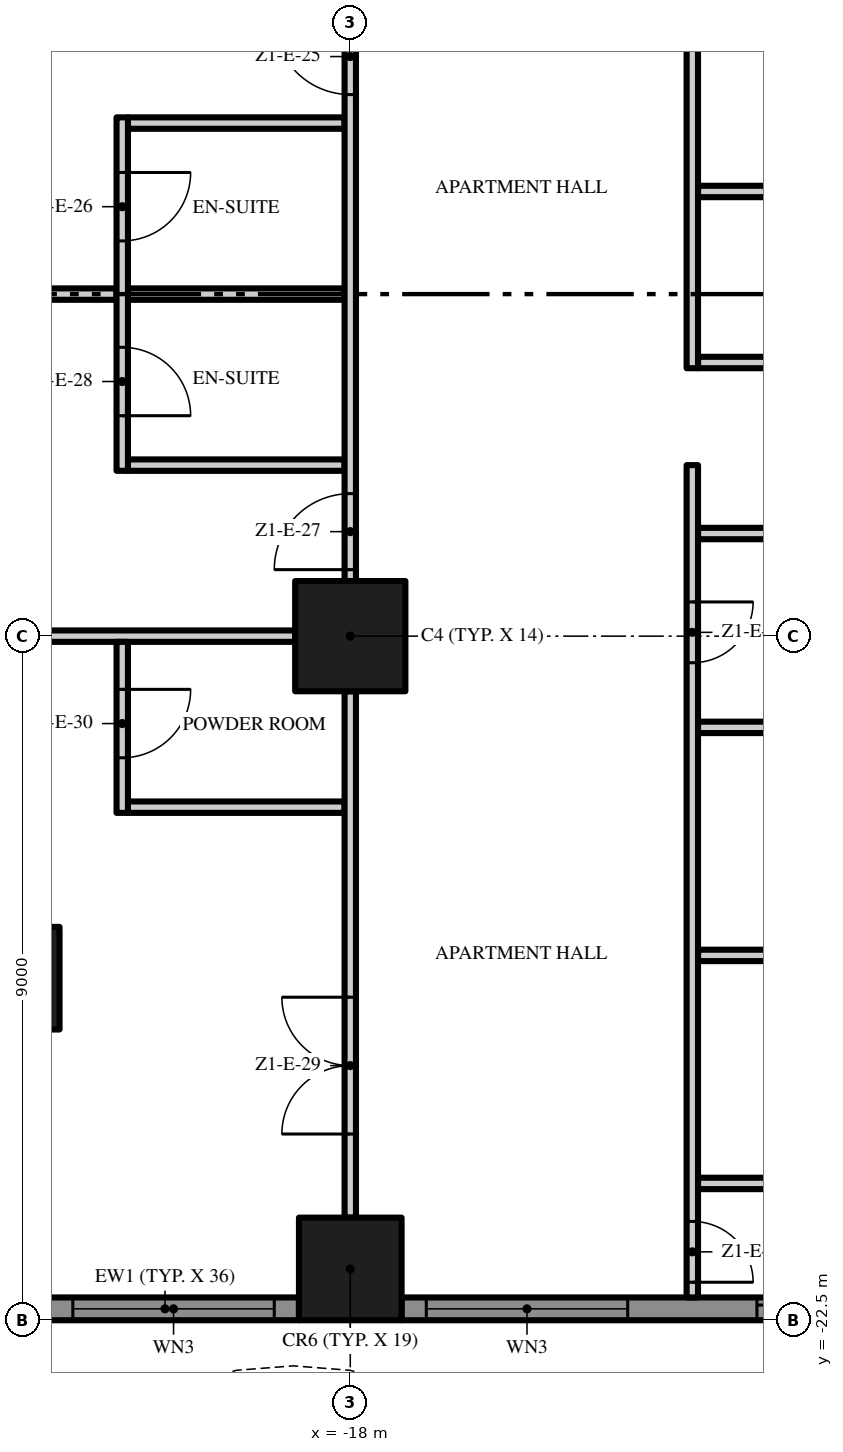
"""IFC4 building model, lengths in metres.
Left out: names, types, materials, properties, quantities, classifications, styles, units other than length and angle.
Written with IfcOpenShell. Run it as: python <this file> out.ifc"""

import sys

from ifc_helpers import new_model, si_unit, direction, frame, frame_2d, origin, origin_2d, place, context, subcontext, project, spatial, polyline, rectangle, outline, extrude, element, fill, save


model = new_model("IFC4")
c1 = context("Model", 3, precision=1e-05, world=origin(), true_north=direction((0.0, 1.0)))
c2 = subcontext(c1, "Body", "Model", "MODEL_VIEW")
j1 = project(units=[si_unit("LENGTHUNIT", "METRE"), si_unit("PLANEANGLEUNIT", "RADIAN")], contexts=[c1])
p1 = place(None, origin())
s1 = spatial("IfcSite", under=j1, at=p1, CompositionType="ELEMENT")
p2 = place(p1, origin())
s2 = spatial("IfcBuilding", under=s1, at=p2, CompositionType="ELEMENT")
p3 = place(p2, frame((0.0, 0.0, 60.6)))
s3 = spatial("IfcBuildingStorey", under=s2, at=p3, CompositionType="ELEMENT", Elevation=60.6)
p4 = place(p3, frame((-18.0, -13.5, 0.0), z_axis=(0.0, 0.0, 1.0), x_axis=(1.0, 0.0, 0.0)))
e1 = element("IfcColumn", 1, at=p4, inside=s3, PredefinedType="COLUMN", context=c2, shape_type="SweptSolid", body=[
    extrude(rectangle(XDim=1.45, YDim=1.45, at=origin_2d()), origin(), (0.0, 0.0, 1.0), 3.5),
])
for number, where, z_axis, x_axis in (
    (2, (-18.0, -21.825, 0.0), (0.0, 0.0, 1.0), (1.0, 0.0, 0.0)),
    (3, (-22.5, -18.0, 0.0), (0.0, 0.0, 1.0), (1.0, 0.0, 0.0)),
):
    element("IfcColumn", number, at=place(p3, frame(where, z_axis=z_axis, x_axis=x_axis)), inside=s3, PredefinedType="COLUMN", context=c2, shape_type="SweptSolid", body=[
        extrude(rectangle(XDim=1.35, YDim=1.35, at=origin_2d()), origin(), (0.0, 0.0, 1.0), 3.5),
    ])
p5 = place(p3, frame((-18.675, -22.35, 0.0), z_axis=(0.0, 0.0, 1.0), x_axis=(-1.0, 0.0, 0.0)))
e4 = element("IfcWall", 4, at=p5, inside=s3, PredefinedType="SOLIDWALL", context=c2, shape_type="SweptSolid", body=[
    extrude(rectangle(XDim=3.525, YDim=0.3, at=frame_2d((1.762, 0.0))), origin(), (0.0, 0.0, 1.0), 3.5),
])
p6 = place(p5, frame((0.325, 0.0, 0.45)))
e5 = element("IfcOpeningElement", 5, at=p6, cuts=e4, PredefinedType="OPENING", context=c2, shape_type="SweptSolid", body=[
    extrude(rectangle(XDim=2.65, YDim=2.65, at=frame_2d((1.325, 1.325))), frame((0.0, 0.16, 0.0), z_axis=(0.0, -1.0, 0.0), x_axis=(1.0, 0.0, 0.0)), (0.0, 0.0, 1.0), 0.32),
])
p7 = place(p3, frame((-9.675, -22.35, 0.0), z_axis=(0.0, 0.0, 1.0), x_axis=(-1.0, 0.0, 0.0)))
e6 = element("IfcWall", 6, at=p7, inside=s3, PredefinedType="SOLIDWALL", context=c2, shape_type="SweptSolid", body=[
    extrude(rectangle(XDim=7.65, YDim=0.3, at=frame_2d((3.825, 0.0))), origin(), (0.0, 0.0, 1.0), 3.5),
])
p8 = place(p7, frame((4.675, 0.0, 0.45)))
e7 = element("IfcOpeningElement", 7, at=p8, cuts=e6, PredefinedType="OPENING", context=c2, shape_type="SweptSolid", body=[
    extrude(rectangle(XDim=2.65, YDim=2.65, at=frame_2d((1.325, 1.325))), frame((0.0, 0.16, 0.0), z_axis=(0.0, -1.0, 0.0), x_axis=(1.0, 0.0, 0.0)), (0.0, 0.0, 1.0), 0.32),
])
p9 = place(p7, frame((0.325, 0.0, 0.0)))
e8 = element("IfcOpeningElement", 8, at=p9, cuts=e6, PredefinedType="OPENING", context=c2, shape_type="SweptSolid", body=[
    extrude(rectangle(XDim=2.65, YDim=2.4, at=frame_2d((1.325, 1.2))), frame((0.0, 0.16, 0.0), z_axis=(0.0, -1.0, 0.0), x_axis=(1.0, 0.0, 0.0)), (0.0, 0.0, 1.0), 0.32),
])
p10 = place(p3, origin())
e9 = element("IfcWall", 9, at=p10, inside=s3, PredefinedType="USERDEFINED", context=c2, shape_type="SweptSolid", body=[
    extrude(outline(polyline([(-22.5, -24.3), (-21.0, -23.595), (-19.5, -23.159), (-18.75, -23.1), (-18.0, -23.159), (-16.5, -23.595), (-15.0, -24.3), (-13.5, -25.005), (-12.0, -25.441), (-11.25, -25.5), (-10.5, -25.441), (-9.0, -25.005), (-7.5, -24.3), (-6.0, -23.595), (-4.5, -23.159), (-3.75, -23.1), (-3.0, -23.159), (-1.5, -23.595), (0.0, -24.3), (1.5, -25.005), (3.0, -25.441), (3.75, -25.5), (4.5, -25.441), (6.0, -25.005), (7.5, -24.3), (9.0, -23.595), (10.5, -23.159), (11.25, -23.1), (12.0, -23.159), (13.5, -23.595), (15.0, -24.3), (16.5, -25.005), (18.0, -25.441), (18.75, -25.5), (19.5, -25.441), (21.0, -25.005), (22.5, -24.3), (22.394, -24.074), (20.911, -24.771), (19.455, -25.194), (18.75, -25.249), (18.045, -25.194), (16.589, -24.771), (15.106, -24.074), (13.589, -23.36), (12.045, -22.911), (11.25, -22.849), (10.455, -22.911), (8.911, -23.36), (7.394, -24.074), (5.911, -24.771), (4.455, -25.194), (3.75, -25.249), (3.045, -25.194), (1.589, -24.771), (0.106, -24.074), (-1.411, -23.36), (-2.955, -22.911), (-3.75, -22.849), (-4.545, -22.911), (-6.089, -23.36), (-7.606, -24.074), (-9.089, -24.771), (-10.545, -25.194), (-11.25, -25.249), (-11.955, -25.194), (-13.411, -24.771), (-14.894, -24.074), (-16.411, -23.36), (-17.955, -22.911), (-18.75, -22.849), (-19.545, -22.911), (-21.089, -23.36), (-22.606, -24.074), (-22.5, -24.3)])), origin(), (0.0, 0.0, 1.0), 0.9),
])
for number, where, z_axis, x_axis in (
    (10, (-13.425, -20.7, 0.0), (0.0, 0.0, 1.0), (1.0, 0.0, 0.0)),
    (11, (-13.425, -17.7, 0.0), (0.0, 0.0, 1.0), (1.0, 0.0, 0.0)),
):
    element("IfcWall", number, at=place(p3, frame(where, z_axis=z_axis, x_axis=x_axis)), inside=s3, PredefinedType="PARTITIONING", context=c2, shape_type="SweptSolid", body=[
        extrude(rectangle(XDim=4.35, YDim=0.15, at=frame_2d((2.175, 0.0))), origin(), (0.0, 0.0, 1.0), 3.5),
    ])
p11 = place(p3, frame((-20.925, -15.75, 0.0), z_axis=(0.0, 0.0, 1.0), x_axis=(1.0, 0.0, 0.0)))
e12 = element("IfcWall", 12, at=p11, inside=s3, PredefinedType="PARTITIONING", context=c2, shape_type="SweptSolid", body=[
    extrude(rectangle(XDim=2.85, YDim=0.15, at=frame_2d((1.425, 0.0))), origin(), (0.0, 0.0, 1.0), 3.5),
])
p12 = place(p3, frame((-13.425, -14.7, 0.0), z_axis=(0.0, 0.0, 1.0), x_axis=(1.0, 0.0, 0.0)))
e13 = element("IfcWall", 13, at=p12, inside=s3, PredefinedType="PARTITIONING", context=c2, shape_type="SweptSolid", body=[
    extrude(rectangle(XDim=4.35, YDim=0.15, at=frame_2d((2.175, 0.0))), origin(), (0.0, 0.0, 1.0), 3.5),
])
p13 = place(p3, frame((-25.65, -13.5, 0.0), z_axis=(0.0, 0.0, 1.0), x_axis=(1.0, 0.0, 0.0)))
e14 = element("IfcWall", 14, at=p13, inside=s3, PredefinedType="PARTITIONING", context=c2, shape_type="SweptSolid", body=[
    extrude(rectangle(XDim=6.925, YDim=0.15, at=frame_2d((3.462, 0.0))), origin(), (0.0, 0.0, 1.0), 3.5),
])
p14 = place(p3, frame((-13.425, -12.15, 0.0), z_axis=(0.0, 0.0, 1.0), x_axis=(1.0, 0.0, 0.0)))
e15 = element("IfcWall", 15, at=p14, inside=s3, PredefinedType="PARTITIONING", context=c2, shape_type="SweptSolid", body=[
    extrude(rectangle(XDim=4.35, YDim=0.15, at=frame_2d((2.175, 0.0))), origin(), (0.0, 0.0, 1.0), 3.5),
])
p15 = place(p3, frame((-20.925, -11.25, 0.0), z_axis=(0.0, 0.0, 1.0), x_axis=(1.0, 0.0, 0.0)))
e16 = element("IfcWall", 16, at=p15, inside=s3, PredefinedType="PARTITIONING", context=c2, shape_type="SweptSolid", body=[
    extrude(rectangle(XDim=2.85, YDim=0.15, at=frame_2d((1.425, 0.0))), origin(), (0.0, 0.0, 1.0), 3.5),
])
p16 = place(p3, frame((-13.425, -9.9, 0.0), z_axis=(0.0, 0.0, 1.0), x_axis=(1.0, 0.0, 0.0)))
e17 = element("IfcWall", 17, at=p16, inside=s3, PredefinedType="PARTITIONING", context=c2, shape_type="SweptSolid", body=[
    extrude(rectangle(XDim=4.35, YDim=0.15, at=frame_2d((2.175, 0.0))), origin(), (0.0, 0.0, 1.0), 3.5),
])
p17 = place(p16, frame((1.75, 0.0, 0.0)))
e18 = element("IfcOpeningElement", 18, at=p17, cuts=e17, PredefinedType="OPENING", context=c2, shape_type="SweptSolid", body=[
    extrude(rectangle(XDim=0.9, YDim=2.1, at=frame_2d((0.45, 1.05))), frame((0.0, 0.085, 0.0), z_axis=(0.0, -1.0, 0.0), x_axis=(1.0, 0.0, 0.0)), (0.0, 0.0, 1.0), 0.17),
])
p18 = place(p3, frame((-26.7, -9.0, 0.0), z_axis=(0.0, 0.0, 1.0), x_axis=(1.0, 0.0, 0.0)))
e19 = element("IfcWall", 19, at=p18, inside=s3, PredefinedType="PARTITIONING", context=c2, shape_type="SweptSolid", body=[
    extrude(rectangle(XDim=5.625, YDim=0.15, at=frame_2d((2.812, 0.0))), origin(), (0.0, 0.0, 1.0), 3.5),
])
p19 = place(p3, frame((-20.925, -9.0, 0.0), z_axis=(0.0, 0.0, 1.0), x_axis=(1.0, 0.0, 0.0)))
e20 = element("IfcWall", 20, at=p19, inside=s3, PredefinedType="PARTITIONING", context=c2, shape_type="SweptSolid", body=[
    extrude(rectangle(XDim=2.85, YDim=0.15, at=frame_2d((1.425, 0.0))), origin(), (0.0, 0.0, 1.0), 3.5),
])
p20 = place(p3, frame((-13.425, -7.65, 0.0), z_axis=(0.0, 0.0, 1.0), x_axis=(1.0, 0.0, 0.0)))
e21 = element("IfcWall", 21, at=p20, inside=s3, PredefinedType="PARTITIONING", context=c2, shape_type="SweptSolid", body=[
    extrude(rectangle(XDim=4.35, YDim=0.15, at=frame_2d((2.175, 0.0))), origin(), (0.0, 0.0, 1.0), 3.5),
])
p21 = place(p3, frame((-20.925, -6.75, 0.0), z_axis=(0.0, 0.0, 1.0), x_axis=(1.0, 0.0, 0.0)))
e22 = element("IfcWall", 22, at=p21, inside=s3, PredefinedType="PARTITIONING", context=c2, shape_type="SweptSolid", body=[
    extrude(rectangle(XDim=2.85, YDim=0.15, at=frame_2d((1.425, 0.0))), origin(), (0.0, 0.0, 1.0), 3.5),
])
p22 = place(p3, frame((-21.0, -13.575, 0.0), z_axis=(0.0, 0.0, 1.0), x_axis=(0.0, -1.0, 0.0)))
e23 = element("IfcWall", 23, at=p22, inside=s3, PredefinedType="PARTITIONING", context=c2, shape_type="SweptSolid", body=[
    extrude(rectangle(XDim=2.25, YDim=0.15, at=frame_2d((1.125, 0.0))), origin(), (0.0, 0.0, 1.0), 3.5),
])
p23 = place(p22, frame((0.625, 0.0, 0.0)))
e24 = element("IfcOpeningElement", 24, at=p23, cuts=e23, PredefinedType="OPENING", context=c2, shape_type="SweptSolid", body=[
    extrude(rectangle(XDim=0.9, YDim=2.1, at=frame_2d((0.45, 1.05))), frame((0.0, 0.085, 0.0), z_axis=(0.0, -1.0, 0.0), x_axis=(1.0, 0.0, 0.0)), (0.0, 0.0, 1.0), 0.17),
])
p24 = place(p3, frame((-21.0, -6.675, 0.0), z_axis=(0.0, 0.0, 1.0), x_axis=(0.0, -1.0, 0.0)))
e25 = element("IfcWall", 25, at=p24, inside=s3, PredefinedType="PARTITIONING", context=c2, shape_type="SweptSolid", body=[
    extrude(rectangle(XDim=4.65, YDim=0.15, at=frame_2d((2.325, 0.0))), origin(), (0.0, 0.0, 1.0), 3.5),
])
p25 = place(p24, frame((0.725, 0.0, 0.0)))
e26 = element("IfcOpeningElement", 26, at=p25, cuts=e25, PredefinedType="OPENING", context=c2, shape_type="SweptSolid", body=[
    extrude(rectangle(XDim=0.9, YDim=2.1, at=frame_2d((0.45, 1.05))), frame((0.0, 0.085, 0.0), z_axis=(0.0, -1.0, 0.0), x_axis=(1.0, 0.0, 0.0)), (0.0, 0.0, 1.0), 0.17),
])
p26 = place(p24, frame((3.025, 0.0, 0.0)))
e27 = element("IfcOpeningElement", 27, at=p26, cuts=e25, PredefinedType="OPENING", context=c2, shape_type="SweptSolid", body=[
    extrude(rectangle(XDim=0.9, YDim=2.1, at=frame_2d((0.45, 1.05))), frame((0.0, 0.085, 0.0), z_axis=(0.0, -1.0, 0.0), x_axis=(1.0, 0.0, 0.0)), (0.0, 0.0, 1.0), 0.17),
])
p27 = place(p3, frame((-18.0, -21.15, 0.0), z_axis=(0.0, 0.0, 1.0), x_axis=(0.0, 1.0, 0.0)))
e28 = element("IfcWall", 28, at=p27, inside=s3, PredefinedType="PARTITIONING", context=c2, shape_type="SweptSolid", body=[
    extrude(rectangle(XDim=6.925, YDim=0.15, at=frame_2d((3.462, 0.0))), origin(), (0.0, 0.0, 1.0), 3.5),
])
p28 = place(p27, frame((1.1, 0.0, 0.0)))
e29 = element("IfcOpeningElement", 29, at=p28, cuts=e28, PredefinedType="OPENING", context=c2, shape_type="SweptSolid", body=[
    extrude(rectangle(XDim=1.8, YDim=2.4, at=frame_2d((0.9, 1.2))), frame((0.0, 0.085, 0.0), z_axis=(0.0, -1.0, 0.0), x_axis=(1.0, 0.0, 0.0)), (0.0, 0.0, 1.0), 0.17),
])
p29 = place(p3, frame((-18.0, -12.775, 0.0), z_axis=(0.0, 0.0, 1.0), x_axis=(0.0, 1.0, 0.0)))
e30 = element("IfcWall", 30, at=p29, inside=s3, PredefinedType="PARTITIONING", context=c2, shape_type="SweptSolid", body=[
    extrude(rectangle(XDim=7.55, YDim=0.15, at=frame_2d((3.775, 0.0))), origin(), (0.0, 0.0, 1.0), 3.5),
])
p30 = place(p29, frame((6.4, 0.0, 0.0)))
e31 = element("IfcOpeningElement", 31, at=p30, cuts=e30, PredefinedType="OPENING", context=c2, shape_type="SweptSolid", body=[
    extrude(rectangle(XDim=1.0, YDim=2.4, at=frame_2d((0.5, 1.2))), frame((0.0, 0.085, 0.0), z_axis=(0.0, -1.0, 0.0), x_axis=(1.0, 0.0, 0.0)), (0.0, 0.0, 1.0), 0.17),
])
p31 = place(p29, frame((0.15, 0.0, 0.0)))
e32 = element("IfcOpeningElement", 32, at=p31, cuts=e30, PredefinedType="OPENING", context=c2, shape_type="SweptSolid", body=[
    extrude(rectangle(XDim=1.0, YDim=2.4, at=frame_2d((0.5, 1.2))), frame((0.0, 0.085, 0.0), z_axis=(0.0, -1.0, 0.0), x_axis=(1.0, 0.0, 0.0)), (0.0, 0.0, 1.0), 0.17),
])
p32 = place(p3, frame((-13.5, -11.25, 0.0), z_axis=(0.0, 0.0, 1.0), x_axis=(0.0, -1.0, 0.0)))
e33 = element("IfcWall", 33, at=p32, inside=s3, PredefinedType="PARTITIONING", context=c2, shape_type="SweptSolid", body=[
    extrude(rectangle(XDim=10.95, YDim=0.15, at=frame_2d((5.475, 0.0))), origin(), (0.0, 0.0, 1.0), 3.5),
])
p33 = place(p32, frame((1.8, 0.0, 0.0)))
e34 = element("IfcOpeningElement", 34, at=p33, cuts=e33, PredefinedType="OPENING", context=c2, shape_type="SweptSolid", body=[
    extrude(rectangle(XDim=0.8, YDim=2.0, at=frame_2d((0.4, 1.0))), frame((0.0, 0.085, 0.0), z_axis=(0.0, -1.0, 0.0), x_axis=(1.0, 0.0, 0.0)), (0.0, 0.0, 1.0), 0.17),
])
p34 = place(p32, frame((9.95, 0.0, 0.0)))
e35 = element("IfcOpeningElement", 35, at=p34, cuts=e33, PredefinedType="OPENING", context=c2, shape_type="SweptSolid", body=[
    extrude(rectangle(XDim=0.8, YDim=2.0, at=frame_2d((0.4, 1.0))), frame((0.0, 0.085, 0.0), z_axis=(0.0, -1.0, 0.0), x_axis=(1.0, 0.0, 0.0)), (0.0, 0.0, 1.0), 0.17),
])
p35 = place(p3, frame((-13.5, -9.975, 0.0), z_axis=(0.0, 0.0, 1.0), x_axis=(0.0, 1.0, 0.0)))
e36 = element("IfcWall", 36, at=p35, inside=s3, PredefinedType="PARTITIONING", context=c2, shape_type="SweptSolid", body=[
    extrude(rectangle(XDim=9.875, YDim=0.15, at=frame_2d((4.938, 0.0))), origin(), (0.0, 0.0, 1.0), 3.5),
])
p36 = place(p6, origin())
e37 = element("IfcWindow", 37, at=p36, inside=s3, PartitioningType="SINGLE_PANEL", PredefinedType="WINDOW", context=c2, shape_type="SweptSolid", body=[
    extrude(rectangle(XDim=2.65, YDim=2.65, at=frame_2d((1.325, 1.325))), frame((0.0, 0.03, 0.0), z_axis=(0.0, -1.0, 0.0), x_axis=(1.0, 0.0, 0.0)), (0.0, 0.0, 1.0), 0.06),
])
fill(e5, e37)
p37 = place(p8, origin())
e38 = element("IfcWindow", 38, at=p37, inside=s3, PartitioningType="SINGLE_PANEL", PredefinedType="WINDOW", context=c2, shape_type="SweptSolid", body=[
    extrude(rectangle(XDim=2.65, YDim=2.65, at=frame_2d((1.325, 1.325))), frame((0.0, 0.03, 0.0), z_axis=(0.0, -1.0, 0.0), x_axis=(1.0, 0.0, 0.0)), (0.0, 0.0, 1.0), 0.06),
])
fill(e7, e38)
p38 = place(p9, origin())
e39 = element("IfcDoor", 39, at=p38, inside=s3, OperationType="SINGLE_SWING_LEFT", PredefinedType="DOOR", context=c2, shape_type="SweptSolid", body=[
    extrude(rectangle(XDim=2.65, YDim=2.4, at=frame_2d((1.325, 1.2))), frame((0.0, 0.025, 0.0), z_axis=(0.0, -1.0, 0.0), x_axis=(1.0, 0.0, 0.0)), (0.0, 0.0, 1.0), 0.05),
])
fill(e8, e39)
p39 = place(p33, origin())
e40 = element("IfcDoor", 40, at=p39, inside=s3, OperationType="SINGLE_SWING_LEFT", PredefinedType="DOOR", context=c2, shape_type="SweptSolid", body=[
    extrude(rectangle(XDim=0.8, YDim=2.0, at=frame_2d((0.4, 1.0))), frame((0.0, 0.025, 0.0), z_axis=(0.0, -1.0, 0.0), x_axis=(1.0, 0.0, 0.0)), (0.0, 0.0, 1.0), 0.05),
])
fill(e34, e40)
p40 = place(p34, origin())
e41 = element("IfcDoor", 41, at=p40, inside=s3, OperationType="SINGLE_SWING_RIGHT", PredefinedType="DOOR", context=c2, shape_type="SweptSolid", body=[
    extrude(rectangle(XDim=0.8, YDim=2.0, at=frame_2d((0.4, 1.0))), frame((0.0, 0.025, 0.0), z_axis=(0.0, -1.0, 0.0), x_axis=(1.0, 0.0, 0.0)), (0.0, 0.0, 1.0), 0.05),
])
fill(e35, e41)
p41 = place(p30, origin())
e42 = element("IfcDoor", 42, at=p41, inside=s3, OperationType="SINGLE_SWING_RIGHT", PredefinedType="DOOR", context=c2, shape_type="SweptSolid", body=[
    extrude(rectangle(XDim=1.0, YDim=2.4, at=frame_2d((0.5, 1.2))), frame((0.0, 0.025, 0.0), z_axis=(0.0, -1.0, 0.0), x_axis=(1.0, 0.0, 0.0)), (0.0, 0.0, 1.0), 0.05),
])
fill(e31, e42)
p42 = place(p25, origin())
e43 = element("IfcDoor", 43, at=p42, inside=s3, OperationType="SINGLE_SWING_LEFT", PredefinedType="DOOR", context=c2, shape_type="SweptSolid", body=[
    extrude(rectangle(XDim=0.9, YDim=2.1, at=frame_2d((0.45, 1.05))), frame((0.0, 0.025, 0.0), z_axis=(0.0, -1.0, 0.0), x_axis=(1.0, 0.0, 0.0)), (0.0, 0.0, 1.0), 0.05),
])
fill(e26, e43)
p43 = place(p31, origin())
e44 = element("IfcDoor", 44, at=p43, inside=s3, OperationType="SINGLE_SWING_LEFT", PredefinedType="DOOR", context=c2, shape_type="SweptSolid", body=[
    extrude(rectangle(XDim=1.0, YDim=2.4, at=frame_2d((0.5, 1.2))), frame((0.0, 0.025, 0.0), z_axis=(0.0, -1.0, 0.0), x_axis=(1.0, 0.0, 0.0)), (0.0, 0.0, 1.0), 0.05),
])
fill(e32, e44)
p44 = place(p26, origin())
e45 = element("IfcDoor", 45, at=p44, inside=s3, OperationType="SINGLE_SWING_RIGHT", PredefinedType="DOOR", context=c2, shape_type="SweptSolid", body=[
    extrude(rectangle(XDim=0.9, YDim=2.1, at=frame_2d((0.45, 1.05))), frame((0.0, 0.025, 0.0), z_axis=(0.0, -1.0, 0.0), x_axis=(1.0, 0.0, 0.0)), (0.0, 0.0, 1.0), 0.05),
])
fill(e27, e45)
p45 = place(p28, origin())
e46 = element("IfcDoor", 46, at=p45, inside=s3, OperationType="DOUBLE_DOOR_SINGLE_SWING", PredefinedType="DOOR", context=c2, shape_type="SweptSolid", body=[
    extrude(rectangle(XDim=1.8, YDim=2.4, at=frame_2d((0.9, 1.2))), frame((0.0, 0.025, 0.0), z_axis=(0.0, -1.0, 0.0), x_axis=(1.0, 0.0, 0.0)), (0.0, 0.0, 1.0), 0.05),
])
fill(e29, e46)
p46 = place(p23, origin())
e47 = element("IfcDoor", 47, at=p46, inside=s3, OperationType="SINGLE_SWING_LEFT", PredefinedType="DOOR", context=c2, shape_type="SweptSolid", body=[
    extrude(rectangle(XDim=0.9, YDim=2.1, at=frame_2d((0.45, 1.05))), frame((0.0, 0.025, 0.0), z_axis=(0.0, -1.0, 0.0), x_axis=(1.0, 0.0, 0.0)), (0.0, 0.0, 1.0), 0.05),
])
fill(e24, e47)
save(model, sys.argv[1])
